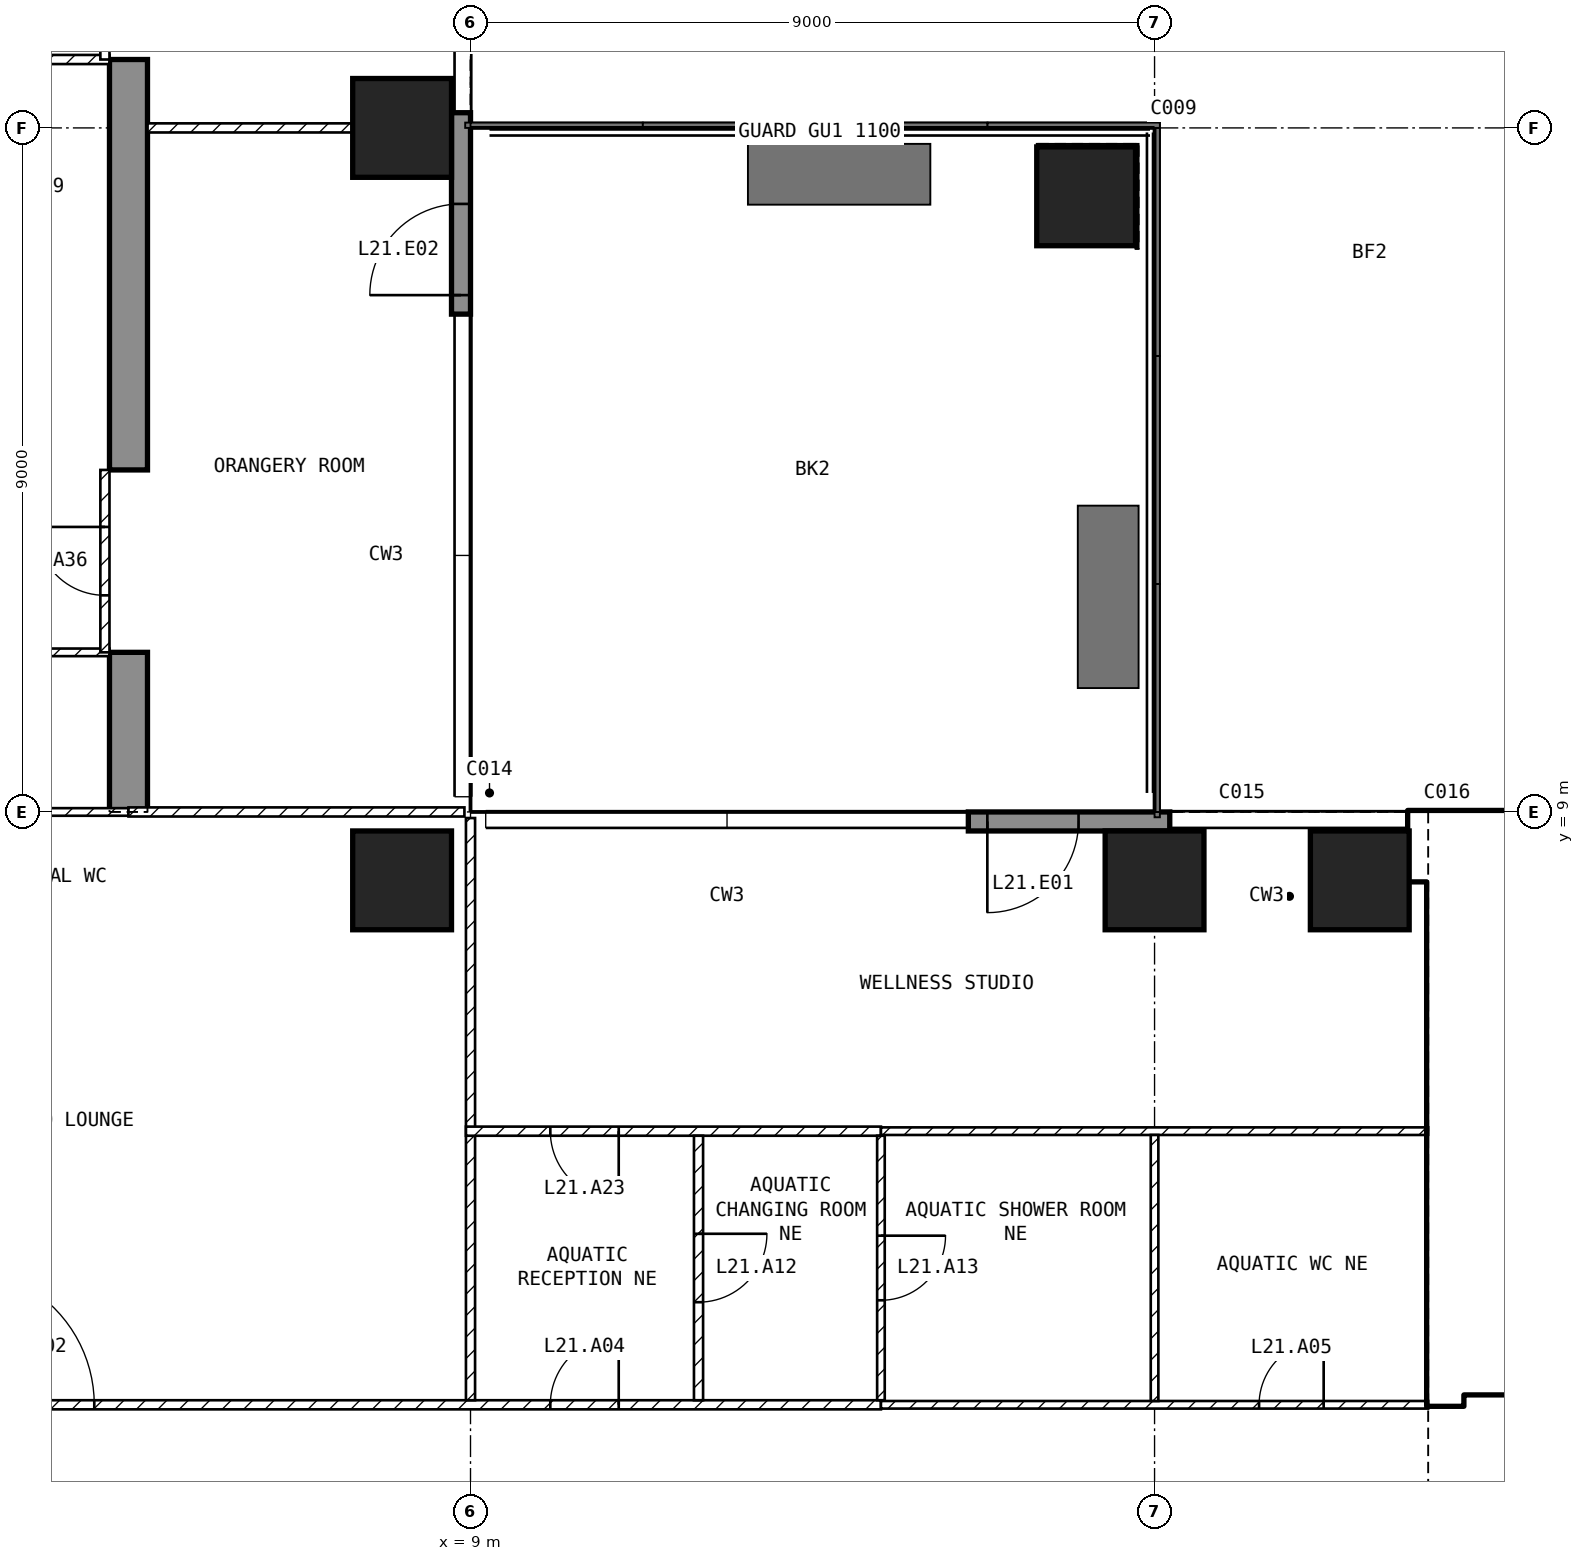
"""IFC4 building model, lengths in metres.
Left out: names, types, materials, properties, quantities, classifications, styles, units other than length and angle.
Written with IfcOpenShell. Run it as: python <this file> out.ifc"""

import sys

from ifc_helpers import new_model, si_unit, direction, frame, frame_2d, origin, origin_2d, place, context, subcontext, project, spatial, polyline, rectangle, outline, extrude, element, fill, save


model = new_model("IFC4")
c1 = context("Model", 3, precision=1e-05, world=origin(), true_north=direction((0.0, 1.0)))
c2 = subcontext(c1, "Body", "Model", "MODEL_VIEW")
j1 = project(units=[si_unit("LENGTHUNIT", "METRE"), si_unit("PLANEANGLEUNIT", "RADIAN")], contexts=[c1])
p1 = place(None, origin())
s1 = spatial("IfcSite", under=j1, at=p1, CompositionType="ELEMENT")
p2 = place(p1, origin())
s2 = spatial("IfcBuilding", under=s1, at=p2, CompositionType="ELEMENT")
p3 = place(p2, frame((0.0, 0.0, 92.5)))
s3 = spatial("IfcBuildingStorey", under=s2, at=p3, CompositionType="ELEMENT", Elevation=92.5)
for number, where, z_axis, x_axis in (
    (1, (8.1, 8.1, -0.3), (0.0, 0.0, 1.0), (1.0, 0.0, 0.0)),
    (2, (8.1, 18.0, -0.3), (0.0, 0.0, 1.0), (1.0, 0.0, 0.0)),
    (3, (18.0, 8.1, -0.3), (0.0, 0.0, 1.0), (1.0, 0.0, 0.0)),
    (4, (20.7, 8.1, -0.3), (0.0, 0.0, 1.0), (1.0, 0.0, 0.0)),
    (5, (17.1, 17.1, -0.3), (0.0, 0.0, 1.0), (1.0, 0.0, 0.0)),
):
    element("IfcColumn", number, at=place(p3, frame(where, z_axis=z_axis, x_axis=x_axis)), inside=s3, PredefinedType="COLUMN", context=c2, shape_type="SweptSolid", body=[
        extrude(rectangle(XDim=1.3, YDim=1.3, at=origin_2d()), origin(), (0.0, 0.0, 1.0), 5.25),
    ])
p4 = place(p3, frame((4.25, 9.0, -0.3), z_axis=(1.0, 0.0, 0.0), x_axis=(0.0, 1.0, 0.0)))
e6 = element("IfcWall", 6, at=p4, inside=s3, PredefinedType="SHEAR", context=c2, shape_type="SweptSolid", body=[
    extrude(outline(polyline([(0.0, 0.0), (2.1, 0.0), (2.1, 2.7), (4.5, 2.7), (4.5, 0.0), (9.9, 0.0), (9.9, 2.7), (12.3, 2.7), (12.3, 0.0), (16.45, 0.0), (16.45, 5.25), (0.0, 5.25), (0.0, 0.0)])), origin(), (0.0, 0.0, 1.0), 0.5),
])
p5 = place(p3, frame((18.2, 8.875, 0.0), z_axis=(0.0, 0.0, 1.0), x_axis=(-1.0, 0.0, 0.0)))
e7 = element("IfcWall", 7, at=p5, inside=s3, PredefinedType="SOLIDWALL", context=c2, shape_type="SweptSolid", body=[
    extrude(rectangle(XDim=2.65, YDim=0.25, at=frame_2d((1.325, 0.0))), origin(), (0.0, 0.0, 1.0), 4.95),
])
p6 = place(p5, frame((1.2, 0.0, 0.0)))
e8 = element("IfcOpeningElement", 8, at=p6, cuts=e7, PredefinedType="OPENING", context=c2, shape_type="SweptSolid", body=[
    extrude(rectangle(XDim=1.2, YDim=2.4, at=frame_2d((0.6, 1.2))), frame((0.0, 0.135, 0.0), z_axis=(0.0, -1.0, 0.0), x_axis=(1.0, 0.0, 0.0)), (0.0, 0.0, 1.0), 0.27),
])
p7 = place(p3, frame((8.875, 15.55, 0.0), z_axis=(0.0, 0.0, 1.0), x_axis=(0.0, 1.0, 0.0)))
e9 = element("IfcWall", 9, at=p7, inside=s3, PredefinedType="SOLIDWALL", context=c2, shape_type="SweptSolid", body=[
    extrude(rectangle(XDim=2.65, YDim=0.25, at=frame_2d((1.325, 0.0))), origin(), (0.0, 0.0, 1.0), 4.95),
])
p8 = place(p7, frame((0.25, 0.0, 0.0)))
e10 = element("IfcOpeningElement", 10, at=p8, cuts=e9, PredefinedType="OPENING", context=c2, shape_type="SweptSolid", body=[
    extrude(rectangle(XDim=1.2, YDim=2.4, at=frame_2d((0.6, 1.2))), frame((0.0, 0.135, 0.0), z_axis=(0.0, -1.0, 0.0), x_axis=(1.0, 0.0, 0.0)), (0.0, 0.0, 1.0), 0.27),
])
p9 = place(p3, frame((21.35, 8.55, 0.0), z_axis=(0.0, 0.0, 1.0), x_axis=(1.0, 0.0, 0.0)))
e11 = element("IfcWall", 11, at=p9, inside=s3, PredefinedType="SHEAR", context=c2, shape_type="SweptSolid", body=[
    extrude(rectangle(XDim=10.15, YDim=0.9, at=frame_2d((5.075, 0.0))), origin(), (0.0, 0.0, 1.0), 4.95),
])
p10 = place(p3, frame((21.825, 1.2, 0.0), z_axis=(0.0, 0.0, 1.0), x_axis=(0.0, 1.0, 0.0)))
e12 = element("IfcWall", 12, at=p10, inside=s3, PredefinedType="SHEAR", context=c2, shape_type="SweptSolid", body=[
    extrude(rectangle(XDim=6.9, YDim=0.45, at=frame_2d((3.45, 0.0))), origin(), (0.0, 0.0, 1.0), 4.95),
])
p11 = place(p3, frame((22.05, 1.45, 0.0), z_axis=(0.0, 0.0, 1.0), x_axis=(1.0, 0.0, 0.0)))
e13 = element("IfcWall", 13, at=p11, inside=s3, PredefinedType="SOLIDWALL", context=c2, shape_type="SweptSolid", body=[
    extrude(rectangle(XDim=13.05, YDim=0.2, at=frame_2d((6.525, 0.0))), origin(), (0.0, 0.0, 1.0), 4.95),
])
p12 = place(p11, frame((8.6, 0.0, 0.0)))
e14 = element("IfcOpeningElement", 14, at=p12, cuts=e13, PredefinedType="OPENING", context=c2, shape_type="SweptSolid", body=[
    extrude(rectangle(XDim=1.0, YDim=2.1, at=frame_2d((0.5, 1.05))), frame((0.0, 0.11, 0.0), z_axis=(0.0, -1.0, 0.0), x_axis=(1.0, 0.0, 0.0)), (0.0, 0.0, 1.0), 0.22),
])
p13 = place(p11, frame((11.1, 0.0, 0.0)))
e15 = element("IfcOpeningElement", 15, at=p13, cuts=e13, PredefinedType="OPENING", context=c2, shape_type="SweptSolid", body=[
    extrude(rectangle(XDim=1.0, YDim=2.1, at=frame_2d((0.5, 1.05))), frame((0.0, 0.11, 0.0), z_axis=(0.0, -1.0, 0.0), x_axis=(1.0, 0.0, 0.0)), (0.0, 0.0, 1.0), 0.22),
])
p14 = place(p11, frame((0.75, 0.0, 0.0)))
e16 = element("IfcOpeningElement", 16, at=p14, cuts=e13, PredefinedType="OPENING", context=c2, shape_type="SweptSolid", body=[
    extrude(rectangle(XDim=1.0, YDim=2.1, at=frame_2d((0.5, 1.05))), frame((0.0, 0.11, 0.0), z_axis=(0.0, -1.0, 0.0), x_axis=(1.0, 0.0, 0.0)), (0.0, 0.0, 1.0), 0.22),
])
p15 = place(p11, frame((3.25, 0.0, 0.0)))
e17 = element("IfcOpeningElement", 17, at=p15, cuts=e13, PredefinedType="OPENING", context=c2, shape_type="SweptSolid", body=[
    extrude(rectangle(XDim=1.0, YDim=2.1, at=frame_2d((0.5, 1.05))), frame((0.0, 0.11, 0.0), z_axis=(0.0, -1.0, 0.0), x_axis=(1.0, 0.0, 0.0)), (0.0, 0.0, 1.0), 0.22),
])
p16 = place(p3, frame((22.05, 5.15, 0.0), z_axis=(0.0, 0.0, 1.0), x_axis=(1.0, 0.0, 0.0)))
e18 = element("IfcWall", 18, at=p16, inside=s3, PredefinedType="SOLIDWALL", context=c2, shape_type="SweptSolid", body=[
    extrude(rectangle(XDim=6.3, YDim=0.2, at=frame_2d((3.15, 0.0))), origin(), (0.0, 0.0, 1.0), 4.95),
])
p17 = place(p16, frame((0.2, 0.0, 0.0)))
e19 = element("IfcOpeningElement", 19, at=p17, cuts=e18, PredefinedType="OPENING", context=c2, shape_type="SweptSolid", body=[
    extrude(rectangle(XDim=1.0, YDim=2.1, at=frame_2d((0.5, 1.05))), frame((0.0, 0.11, 0.0), z_axis=(0.0, -1.0, 0.0), x_axis=(1.0, 0.0, 0.0)), (0.0, 0.0, 1.0), 0.22),
])
p18 = place(p3, frame((-18.3, 1.2, 0.0), z_axis=(0.0, 0.0, 1.0), x_axis=(1.0, 0.0, 0.0)))
e20 = element("IfcWall", 20, at=p18, inside=s3, PredefinedType="PARTITIONING", context=c2, shape_type="SweptSolid", body=[
    extrude(rectangle(XDim=32.7, YDim=0.12, at=frame_2d((16.35, 0.0))), origin(), (0.0, 0.0, 1.0), 4.95),
])
p19 = place(p18, frame((11.55, 0.0, 0.0)))
e21 = element("IfcOpeningElement", 21, at=p19, cuts=e20, PredefinedType="OPENING", context=c2, shape_type="SweptSolid", body=[
    extrude(rectangle(XDim=1.8, YDim=2.1, at=frame_2d((0.9, 1.05))), frame((0.0, 0.07, 0.0), z_axis=(0.0, -1.0, 0.0), x_axis=(1.0, 0.0, 0.0)), (0.0, 0.0, 1.0), 0.14),
])
p20 = place(p18, frame((20.55, 0.0, 0.0)))
e22 = element("IfcOpeningElement", 22, at=p20, cuts=e20, PredefinedType="OPENING", context=c2, shape_type="SweptSolid", body=[
    extrude(rectangle(XDim=1.8, YDim=2.1, at=frame_2d((0.9, 1.05))), frame((0.0, 0.07, 0.0), z_axis=(0.0, -1.0, 0.0), x_axis=(1.0, 0.0, 0.0)), (0.0, 0.0, 1.0), 0.14),
])
p21 = place(p18, frame((28.35, 0.0, 0.0)))
e23 = element("IfcOpeningElement", 23, at=p21, cuts=e20, PredefinedType="OPENING", context=c2, shape_type="SweptSolid", body=[
    extrude(rectangle(XDim=0.9, YDim=2.1, at=frame_2d((0.45, 1.05))), frame((0.0, 0.07, 0.0), z_axis=(0.0, -1.0, 0.0), x_axis=(1.0, 0.0, 0.0)), (0.0, 0.0, 1.0), 0.14),
])
p22 = place(p18, frame((6.9, 0.0, 0.0)))
e24 = element("IfcOpeningElement", 24, at=p22, cuts=e20, PredefinedType="OPENING", context=c2, shape_type="SweptSolid", body=[
    extrude(rectangle(XDim=0.9, YDim=2.1, at=frame_2d((0.45, 1.05))), frame((0.0, 0.07, 0.0), z_axis=(0.0, -1.0, 0.0), x_axis=(1.0, 0.0, 0.0)), (0.0, 0.0, 1.0), 0.14),
])
p23 = place(p3, frame((14.4, 1.2, 0.0), z_axis=(0.0, 0.0, 1.0), x_axis=(1.0, 0.0, 0.0)))
e25 = element("IfcWall", 25, at=p23, inside=s3, PredefinedType="PARTITIONING", context=c2, shape_type="SweptSolid", body=[
    extrude(rectangle(XDim=7.2, YDim=0.1, at=frame_2d((3.6, 0.0))), origin(), (0.0, 0.0, 1.0), 4.95),
])
p24 = place(p23, frame((4.975, 0.0, 0.0)))
e26 = element("IfcOpeningElement", 26, at=p24, cuts=e25, PredefinedType="OPENING", context=c2, shape_type="SweptSolid", body=[
    extrude(rectangle(XDim=0.85, YDim=2.1, at=frame_2d((0.425, 1.05))), frame((0.0, 0.06, 0.0), z_axis=(0.0, -1.0, 0.0), x_axis=(1.0, 0.0, 0.0)), (0.0, 0.0, 1.0), 0.12),
])
p25 = place(p3, frame((9.0, 8.92, 0.0), z_axis=(0.0, 0.0, 1.0), x_axis=(0.0, -1.0, 0.0)))
e27 = element("IfcWall", 27, at=p25, inside=s3, PredefinedType="PARTITIONING", context=c2, shape_type="SweptSolid", body=[
    extrude(rectangle(XDim=7.66, YDim=0.12, at=frame_2d((3.83, 0.0))), origin(), (0.0, 0.0, 1.0), 4.95),
])
p26 = place(p3, frame((2.1, 9.0, 0.0), z_axis=(0.0, 0.0, 1.0), x_axis=(1.0, 0.0, 0.0)))
e28 = element("IfcWall", 28, at=p26, inside=s3, PredefinedType="PARTITIONING", context=c2, shape_type="SweptSolid", body=[
    extrude(rectangle(XDim=2.4, YDim=0.1, at=frame_2d((1.2, 0.0))), origin(), (0.0, 0.0, 1.0), 4.95),
])
p27 = place(p3, frame((4.5, 9.0, 0.0), z_axis=(0.0, 0.0, 1.0), x_axis=(1.0, 0.0, 0.0)))
e29 = element("IfcWall", 29, at=p27, inside=s3, PredefinedType="PARTITIONING", context=c2, shape_type="SweptSolid", body=[
    extrude(rectangle(XDim=4.42, YDim=0.12, at=frame_2d((2.21, 0.0))), origin(), (0.0, 0.0, 1.0), 4.95),
])
p28 = place(p3, frame((14.4, 4.8, 0.0), z_axis=(0.0, 0.0, 1.0), x_axis=(-1.0, 0.0, 0.0)))
e30 = element("IfcWall", 30, at=p28, inside=s3, PredefinedType="PARTITIONING", context=c2, shape_type="SweptSolid", body=[
    extrude(rectangle(XDim=5.46, YDim=0.12, at=frame_2d((2.73, 0.0))), origin(), (0.0, 0.0, 1.0), 4.95),
])
p29 = place(p28, frame((3.45, 0.0, 0.0)))
e31 = element("IfcOpeningElement", 31, at=p29, cuts=e30, PredefinedType="OPENING", context=c2, shape_type="SweptSolid", body=[
    extrude(rectangle(XDim=0.9, YDim=2.1, at=frame_2d((0.45, 1.05))), frame((0.0, 0.07, 0.0), z_axis=(0.0, -1.0, 0.0), x_axis=(1.0, 0.0, 0.0)), (0.0, 0.0, 1.0), 0.14),
])
p30 = place(p3, frame((21.6, 4.8, 0.0), z_axis=(0.0, 0.0, 1.0), x_axis=(-1.0, 0.0, 0.0)))
e32 = element("IfcWall", 32, at=p30, inside=s3, PredefinedType="PARTITIONING", context=c2, shape_type="SweptSolid", body=[
    extrude(rectangle(XDim=7.2, YDim=0.1, at=frame_2d((3.6, 0.0))), origin(), (0.0, 0.0, 1.0), 4.95),
])
p31 = place(p3, frame((12.0, 4.74, 0.0), z_axis=(0.0, 0.0, 1.0), x_axis=(0.0, -1.0, 0.0)))
e33 = element("IfcWall", 33, at=p31, inside=s3, PredefinedType="PARTITIONING", context=c2, shape_type="SweptSolid", body=[
    extrude(rectangle(XDim=3.48, YDim=0.12, at=frame_2d((1.74, 0.0))), origin(), (0.0, 0.0, 1.0), 4.95),
])
p32 = place(p31, frame((1.29, 0.0, 0.0)))
e34 = element("IfcOpeningElement", 34, at=p32, cuts=e33, PredefinedType="OPENING", context=c2, shape_type="SweptSolid", body=[
    extrude(rectangle(XDim=0.9, YDim=2.1, at=frame_2d((0.45, 1.05))), frame((0.0, 0.07, 0.0), z_axis=(0.0, -1.0, 0.0), x_axis=(1.0, 0.0, 0.0)), (0.0, 0.0, 1.0), 0.14),
])
p33 = place(p3, frame((14.4, 4.74, 0.0), z_axis=(0.0, 0.0, 1.0), x_axis=(0.0, -1.0, 0.0)))
e35 = element("IfcWall", 35, at=p33, inside=s3, PredefinedType="PARTITIONING", context=c2, shape_type="SweptSolid", body=[
    extrude(rectangle(XDim=3.48, YDim=0.1, at=frame_2d((1.74, 0.0))), origin(), (0.0, 0.0, 1.0), 4.95),
])
p34 = place(p33, frame((1.315, 0.0, 0.0)))
e36 = element("IfcOpeningElement", 36, at=p34, cuts=e35, PredefinedType="OPENING", context=c2, shape_type="SweptSolid", body=[
    extrude(rectangle(XDim=0.85, YDim=2.1, at=frame_2d((0.425, 1.05))), frame((0.0, 0.06, 0.0), z_axis=(0.0, -1.0, 0.0), x_axis=(1.0, 0.0, 0.0)), (0.0, 0.0, 1.0), 0.12),
])
p35 = place(p3, frame((18.0, 4.75, 0.0), z_axis=(0.0, 0.0, 1.0), x_axis=(0.0, -1.0, 0.0)))
e37 = element("IfcWall", 37, at=p35, inside=s3, PredefinedType="PARTITIONING", context=c2, shape_type="SweptSolid", body=[
    extrude(rectangle(XDim=3.5, YDim=0.1, at=frame_2d((1.75, 0.0))), origin(), (0.0, 0.0, 1.0), 4.046),
])
p36 = place(p3, frame((2.1, 11.1, 0.0), z_axis=(0.0, 0.0, 1.0), x_axis=(1.0, 0.0, 0.0)))
e38 = element("IfcWall", 38, at=p36, inside=s3, PredefinedType="PARTITIONING", context=c2, shape_type="SweptSolid", body=[
    extrude(rectangle(XDim=2.15, YDim=0.1, at=frame_2d((1.075, 0.0))), origin(), (0.0, 0.0, 1.0), 4.95),
])
p37 = place(p3, frame((-4.25, 18.9, 0.0), z_axis=(0.0, 0.0, 1.0), x_axis=(1.0, 0.0, 0.0)))
e39 = element("IfcWall", 39, at=p37, inside=s3, PredefinedType="PARTITIONING", context=c2, shape_type="SweptSolid", body=[
    extrude(rectangle(XDim=8.5, YDim=0.12, at=frame_2d((4.25, 0.0))), origin(), (0.0, 0.0, 1.0), 4.95),
])
p38 = place(p37, frame((5.675, 0.0, 0.0)))
e40 = element("IfcOpeningElement", 40, at=p38, cuts=e39, PredefinedType="OPENING", context=c2, shape_type="SweptSolid", body=[
    extrude(rectangle(XDim=0.9, YDim=2.1, at=frame_2d((0.45, 1.05))), frame((0.0, 0.07, 0.0), z_axis=(0.0, -1.0, 0.0), x_axis=(1.0, 0.0, 0.0)), (0.0, 0.0, 1.0), 0.14),
])
p39 = place(p3, frame((4.75, 18.0, 0.0), z_axis=(0.0, 0.0, 1.0), x_axis=(1.0, 0.0, 0.0)))
e41 = element("IfcWall", 41, at=p39, inside=s3, PredefinedType="PARTITIONING", context=c2, shape_type="SweptSolid", body=[
    extrude(rectangle(XDim=2.7, YDim=0.12, at=frame_2d((1.35, 0.0))), origin(), (0.0, 0.0, 1.0), 4.046),
])
p40 = place(p3, frame((4.19, 11.1, 0.0), z_axis=(0.0, 0.0, 1.0), x_axis=(0.0, 1.0, 0.0)))
e42 = element("IfcWall", 42, at=p40, inside=s3, PredefinedType="PARTITIONING", context=c2, shape_type="SweptSolid", body=[
    extrude(rectangle(XDim=2.4, YDim=0.12, at=frame_2d((1.2, 0.0))), origin(), (0.0, 0.0, 1.0), 2.4),
])
p41 = place(p40, frame((0.75, 0.0, 0.0)))
e43 = element("IfcOpeningElement", 43, at=p41, cuts=e42, PredefinedType="OPENING", context=c2, shape_type="SweptSolid", body=[
    extrude(rectangle(XDim=0.9, YDim=2.1, at=frame_2d((0.45, 1.05))), frame((0.0, 0.07, 0.0), z_axis=(0.0, -1.0, 0.0), x_axis=(1.0, 0.0, 0.0)), (0.0, 0.0, 1.0), 0.14),
])
p42 = place(p3, frame((4.19, 18.9, 0.0), z_axis=(0.0, 0.0, 1.0), x_axis=(0.0, 1.0, 0.0)))
e44 = element("IfcWall", 44, at=p42, inside=s3, PredefinedType="PARTITIONING", context=c2, shape_type="SweptSolid", body=[
    extrude(rectangle(XDim=2.4, YDim=0.12, at=frame_2d((1.2, 0.0))), origin(), (0.0, 0.0, 1.0), 2.4),
])
p43 = place(p42, frame((0.75, 0.0, 0.0)))
e45 = element("IfcOpeningElement", 45, at=p43, cuts=e44, PredefinedType="OPENING", context=c2, shape_type="SweptSolid", body=[
    extrude(rectangle(XDim=0.9, YDim=2.1, at=frame_2d((0.45, 1.05))), frame((0.0, 0.07, 0.0), z_axis=(0.0, -1.0, 0.0), x_axis=(1.0, 0.0, 0.0)), (0.0, 0.0, 1.0), 0.14),
])
p44 = place(p6, origin())
e46 = element("IfcDoor", 46, at=p44, inside=s3, OperationType="SINGLE_SWING_RIGHT", PredefinedType="DOOR", context=c2, shape_type="SweptSolid", body=[
    extrude(rectangle(XDim=1.2, YDim=2.4, at=frame_2d((0.6, 1.2))), frame((0.0, 0.025, 0.0), z_axis=(0.0, -1.0, 0.0), x_axis=(1.0, 0.0, 0.0)), (0.0, 0.0, 1.0), 0.05),
])
fill(e8, e46)
p45 = place(p8, origin())
e47 = element("IfcDoor", 47, at=p45, inside=s3, OperationType="SINGLE_SWING_LEFT", PredefinedType="DOOR", context=c2, shape_type="SweptSolid", body=[
    extrude(rectangle(XDim=1.2, YDim=2.4, at=frame_2d((0.6, 1.2))), frame((0.0, 0.025, 0.0), z_axis=(0.0, -1.0, 0.0), x_axis=(1.0, 0.0, 0.0)), (0.0, 0.0, 1.0), 0.05),
])
fill(e10, e47)
p46 = place(p17, origin())
e48 = element("IfcDoor", 48, at=p46, inside=s3, OperationType="SINGLE_SWING_LEFT", PredefinedType="DOOR", context=c2, shape_type="SweptSolid", body=[
    extrude(rectangle(XDim=1.0, YDim=2.1, at=frame_2d((0.5, 1.05))), frame((0.0, 0.025, 0.0), z_axis=(0.0, -1.0, 0.0), x_axis=(1.0, 0.0, 0.0)), (0.0, 0.0, 1.0), 0.05),
])
fill(e19, e48)
p47 = place(p20, origin())
e49 = element("IfcDoor", 49, at=p47, inside=s3, OperationType="SINGLE_SWING_LEFT", PredefinedType="DOOR", context=c2, shape_type="SweptSolid", body=[
    extrude(rectangle(XDim=1.8, YDim=2.1, at=frame_2d((0.9, 1.05))), frame((0.0, 0.025, 0.0), z_axis=(0.0, -1.0, 0.0), x_axis=(1.0, 0.0, 0.0)), (0.0, 0.0, 1.0), 0.05),
])
fill(e22, e49)
p48 = place(p21, origin())
e50 = element("IfcDoor", 50, at=p48, inside=s3, OperationType="SINGLE_SWING_RIGHT", PredefinedType="DOOR", context=c2, shape_type="SweptSolid", body=[
    extrude(rectangle(XDim=0.9, YDim=2.1, at=frame_2d((0.45, 1.05))), frame((0.0, 0.025, 0.0), z_axis=(0.0, -1.0, 0.0), x_axis=(1.0, 0.0, 0.0)), (0.0, 0.0, 1.0), 0.05),
])
fill(e23, e50)
p49 = place(p24, origin())
e51 = element("IfcDoor", 51, at=p49, inside=s3, OperationType="SINGLE_SWING_RIGHT", PredefinedType="DOOR", context=c2, shape_type="SweptSolid", body=[
    extrude(rectangle(XDim=0.85, YDim=2.1, at=frame_2d((0.425, 1.05))), frame((0.0, 0.025, 0.0), z_axis=(0.0, -1.0, 0.0), x_axis=(1.0, 0.0, 0.0)), (0.0, 0.0, 1.0), 0.05),
])
fill(e26, e51)
p50 = place(p32, origin())
e52 = element("IfcDoor", 52, at=p50, inside=s3, OperationType="SINGLE_SWING_LEFT", PredefinedType="DOOR", context=c2, shape_type="SweptSolid", body=[
    extrude(rectangle(XDim=0.9, YDim=2.1, at=frame_2d((0.45, 1.05))), frame((0.0, 0.025, 0.0), z_axis=(0.0, -1.0, 0.0), x_axis=(1.0, 0.0, 0.0)), (0.0, 0.0, 1.0), 0.05),
])
fill(e34, e52)
p51 = place(p34, origin())
e53 = element("IfcDoor", 53, at=p51, inside=s3, OperationType="SINGLE_SWING_LEFT", PredefinedType="DOOR", context=c2, shape_type="SweptSolid", body=[
    extrude(rectangle(XDim=0.85, YDim=2.1, at=frame_2d((0.425, 1.05))), frame((0.0, 0.025, 0.0), z_axis=(0.0, -1.0, 0.0), x_axis=(1.0, 0.0, 0.0)), (0.0, 0.0, 1.0), 0.05),
])
fill(e36, e53)
p52 = place(p29, origin())
e54 = element("IfcDoor", 54, at=p52, inside=s3, OperationType="SINGLE_SWING_LEFT", PredefinedType="DOOR", context=c2, shape_type="SweptSolid", body=[
    extrude(rectangle(XDim=0.9, YDim=2.1, at=frame_2d((0.45, 1.05))), frame((0.0, 0.025, 0.0), z_axis=(0.0, -1.0, 0.0), x_axis=(1.0, 0.0, 0.0)), (0.0, 0.0, 1.0), 0.05),
])
fill(e31, e54)
p53 = place(p41, origin())
e55 = element("IfcDoor", 55, at=p53, inside=s3, OperationType="SINGLE_SWING_RIGHT", PredefinedType="DOOR", context=c2, shape_type="SweptSolid", body=[
    extrude(rectangle(XDim=0.9, YDim=2.1, at=frame_2d((0.45, 1.05))), frame((0.0, 0.025, 0.0), z_axis=(0.0, -1.0, 0.0), x_axis=(1.0, 0.0, 0.0)), (0.0, 0.0, 1.0), 0.05),
])
fill(e43, e55)
save(model, sys.argv[1])
